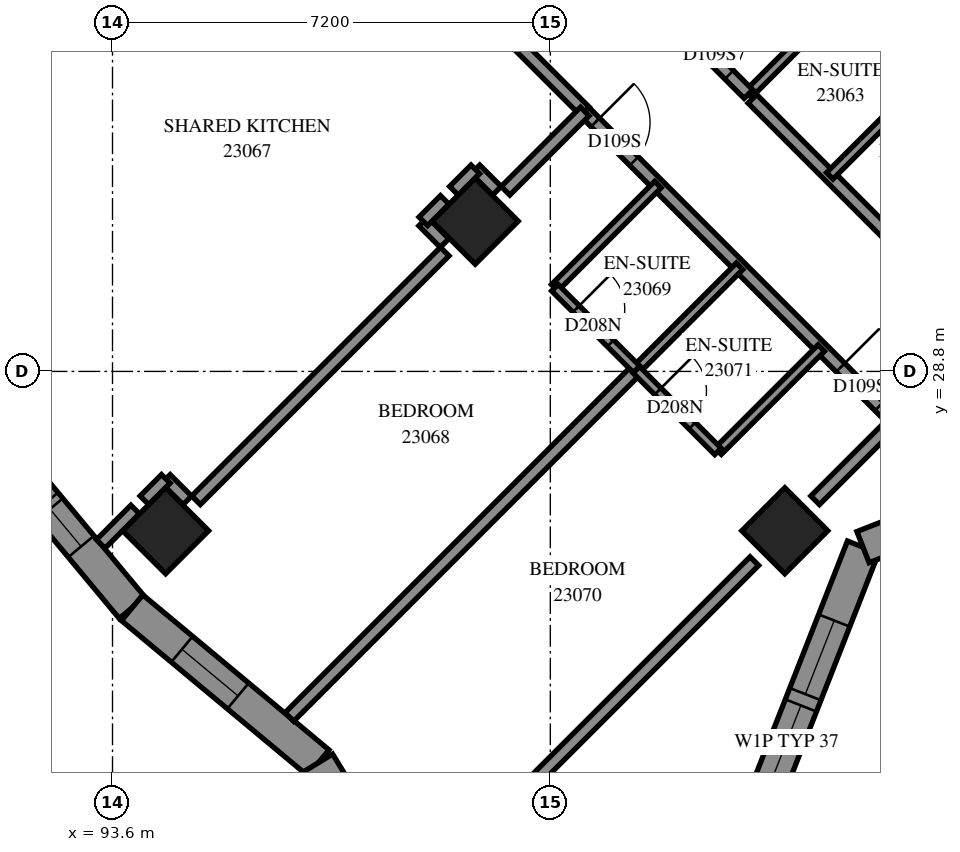
"""IFC4 building model, lengths in metres.
Left out: names, types, materials, properties, quantities, classifications, styles, units other than length and angle.
Written with IfcOpenShell. Run it as: python <this file> out.ifc"""

import sys

from ifc_helpers import new_model, si_unit, direction, frame, frame_2d, origin, origin_2d, place, context, subcontext, project, spatial, polyline, rectangle, outline, extrude, element, fill, save


model = new_model("IFC4")
c1 = context("Model", 3, precision=1e-05, world=origin(), true_north=direction((0.0, 1.0)))
c2 = subcontext(c1, "Body", "Model", "MODEL_VIEW")
j1 = project(units=[si_unit("LENGTHUNIT", "METRE"), si_unit("PLANEANGLEUNIT", "RADIAN")], contexts=[c1])
p1 = place(None, origin())
s1 = spatial("IfcSite", under=j1, at=p1, CompositionType="ELEMENT")
p2 = place(p1, origin())
s2 = spatial("IfcBuilding", under=s1, at=p2, CompositionType="ELEMENT")
p3 = place(p2, frame((0.0, 0.0, 88.0)))
s3 = spatial("IfcBuildingStorey", under=s2, at=p3, CompositionType="ELEMENT", Elevation=88.0)
for number, where, z_axis, x_axis in (
    (1, (99.565, 31.271, 0.0), (0.0, 0.0, 1.0), (0.707, -0.707, 0.0)),
    (2, (94.474, 26.18, 0.0), (0.0, 0.0, 1.0), (0.707, -0.707, 0.0)),
    (3, (104.656, 26.18, 0.0), (0.0, 0.0, 1.0), (0.707, -0.707, 0.0)),
):
    element("IfcColumn", number, at=place(p3, frame(where, z_axis=z_axis, x_axis=x_axis)), inside=s3, PredefinedType="COLUMN", context=c2, shape_type="SweptSolid", body=[
        extrude(rectangle(XDim=1.0, YDim=1.0, at=origin_2d()), origin(), (0.0, 0.0, 1.0), 3.1),
    ])
p4 = place(p3, frame((103.936, 20.796, 0.0), z_axis=(0.0, 0.0, 1.0), x_axis=(0.3651939331, 0.9309314643, 0.0)))
e4 = element("IfcWall", 4, at=p4, inside=s3, PredefinedType="SOLIDWALL", context=c2, shape_type="SweptSolid", body=[
    extrude(outline(polyline([(-0.125, -0.275), (5.374, -0.275), (5.614, 0.275), (0.125, 0.275), (-0.125, -0.275)])), origin(), (0.0, 0.0, 1.0), 3.1),
])
p5 = place(p4, frame((1.397, 0.0, 0.5)))
e5 = element("IfcOpeningElement", 5, at=p5, cuts=e4, PredefinedType="OPENING", context=c2, shape_type="SweptSolid", body=[
    extrude(rectangle(XDim=1.3, YDim=2.45, at=frame_2d((0.65, 1.225))), frame((0.0, 0.285, 0.0), z_axis=(0.0, -1.0, 0.0), x_axis=(1.0, 0.0, 0.0)), (0.0, 0.0, 1.0), 0.57),
])
p6 = place(p4, frame((2.897, 0.0, 0.5)))
e6 = element("IfcOpeningElement", 6, at=p6, cuts=e4, PredefinedType="OPENING", context=c2, shape_type="SweptSolid", body=[
    extrude(rectangle(XDim=1.3, YDim=2.45, at=frame_2d((0.65, 1.225))), frame((0.0, 0.285, 0.0), z_axis=(0.0, -1.0, 0.0), x_axis=(1.0, 0.0, 0.0)), (0.0, 0.0, 1.0), 0.57),
])
p7 = place(p3, frame((105.942, 25.91, 0.0), z_axis=(0.0, 0.0, 1.0), x_axis=(0.9309314643, 0.3651939331, 0.0)))
e7 = element("IfcWall", 7, at=p7, inside=s3, PredefinedType="SOLIDWALL", context=c2, shape_type="SweptSolid", body=[
    extrude(outline(polyline([(0.12, -0.275), (5.62, -0.275), (5.369, 0.275), (-0.12, 0.275), (0.12, -0.275)])), origin(), (0.0, 0.0, 1.0), 3.1),
])
p8 = place(p7, frame((0.605, 0.0, 0.5)))
e8 = element("IfcOpeningElement", 8, at=p8, cuts=e7, PredefinedType="OPENING", context=c2, shape_type="SweptSolid", body=[
    extrude(rectangle(XDim=1.2, YDim=2.45, at=frame_2d((0.6, 1.225))), frame((0.0, 0.285, 0.0), z_axis=(0.0, -1.0, 0.0), x_axis=(1.0, 0.0, 0.0)), (0.0, 0.0, 1.0), 0.57),
])
p9 = place(p7, frame((3.089, 0.0, 0.5)))
e9 = element("IfcOpeningElement", 9, at=p9, cuts=e7, PredefinedType="OPENING", context=c2, shape_type="SweptSolid", body=[
    extrude(rectangle(XDim=1.2, YDim=2.45, at=frame_2d((0.6, 1.225))), frame((0.0, 0.285, 0.0), z_axis=(0.0, -1.0, 0.0), x_axis=(1.0, 0.0, 0.0)), (0.0, 0.0, 1.0), 0.57),
])
p10 = place(p3, frame((91.387, 27.959, 0.0), z_axis=(0.0, 0.0, 1.0), x_axis=(0.6397673833, -0.7685686016, 0.0)))
e10 = element("IfcWall", 10, at=p10, inside=s3, PredefinedType="SOLIDWALL", context=c2, shape_type="SweptSolid", body=[
    extrude(outline(polyline([(0.025, -0.275), (3.989, -0.275), (3.938, 0.275), (-0.025, 0.275), (0.025, -0.275)])), origin(), (0.0, 0.0, 1.0), 3.1),
])
p11 = place(p10, frame((0.428, 0.0, 0.5)))
e11 = element("IfcOpeningElement", 11, at=p11, cuts=e10, PredefinedType="OPENING", context=c2, shape_type="SweptSolid", body=[
    extrude(rectangle(XDim=1.3, YDim=2.45, at=frame_2d((0.65, 1.225))), frame((0.0, 0.285, 0.0), z_axis=(0.0, -1.0, 0.0), x_axis=(1.0, 0.0, 0.0)), (0.0, 0.0, 1.0), 0.57),
])
p12 = place(p10, frame((1.852, 0.0, 0.45)))
e12 = element("IfcOpeningElement", 12, at=p12, cuts=e10, PredefinedType="OPENING", context=c2, shape_type="SweptSolid", body=[
    extrude(rectangle(XDim=0.8, YDim=2.5, at=frame_2d((0.4, 1.25))), frame((0.0, 0.285, 0.0), z_axis=(0.0, -1.0, 0.0), x_axis=(1.0, 0.0, 0.0)), (0.0, 0.0, 1.0), 0.57),
])
p13 = place(p3, frame((93.923, 24.913, 0.0), z_axis=(0.0, 0.0, 1.0), x_axis=(0.7685750371, -0.639759652, 0.0)))
e13 = element("IfcWall", 13, at=p13, inside=s3, PredefinedType="SOLIDWALL", context=c2, shape_type="SweptSolid", body=[
    extrude(outline(polyline([(-0.025, -0.275), (3.938, -0.275), (4.03, 0.275), (0.025, 0.275), (-0.025, -0.275)])), origin(), (0.0, 0.0, 1.0), 3.1),
])
p14 = place(p13, frame((1.066, 0.0, 0.5)))
e14 = element("IfcOpeningElement", 14, at=p14, cuts=e13, PredefinedType="OPENING", context=c2, shape_type="SweptSolid", body=[
    extrude(rectangle(XDim=1.2, YDim=2.45, at=frame_2d((0.6, 1.225))), frame((0.0, 0.285, 0.0), z_axis=(0.0, -1.0, 0.0), x_axis=(1.0, 0.0, 0.0)), (0.0, 0.0, 1.0), 0.57),
])
p15 = place(p3, frame((96.985, 22.364, 0.0), z_axis=(0.0, 0.0, 1.0), x_axis=(0.5197558303, -0.8543148581, 0.0)))
e15 = element("IfcWall", 15, at=p15, inside=s3, PredefinedType="SOLIDWALL", context=c2, shape_type="SweptSolid", body=[
    extrude(outline(polyline([(0.046, -0.275), (4.108, -0.275), (3.661, 0.275), (-0.046, 0.275), (0.046, -0.275)])), origin(), (0.0, 0.0, 1.0), 3.1),
])
p16 = place(p15, frame((0.903, 0.0, 0.5)))
e16 = element("IfcOpeningElement", 16, at=p16, cuts=e15, PredefinedType="OPENING", context=c2, shape_type="SweptSolid", body=[
    extrude(rectangle(XDim=1.2, YDim=2.45, at=frame_2d((0.6, 1.225))), frame((0.0, 0.285, 0.0), z_axis=(0.0, -1.0, 0.0), x_axis=(1.0, 0.0, 0.0)), (0.0, 0.0, 1.0), 0.57),
])
p17 = place(p3, frame((96.509, 23.118, 0.0), z_axis=(0.0, 0.0, 1.0), x_axis=(0.7069829425, 0.7072305982, 0.0)))
e17 = element("IfcWall", 17, at=p17, inside=s3, PredefinedType="PARTITIONING", context=c2, shape_type="SweptSolid", body=[
    extrude(rectangle(XDim=8.076, YDim=0.2, at=frame_2d((4.038, 0.0))), origin(), (0.0, 0.0, 1.0), 3.1),
])
p18 = place(p3, frame((101.365, 33.071, 0.0), z_axis=(0.0, 0.0, 1.0), x_axis=(0.7071067812, -0.7071067812, 0.0)))
e18 = element("IfcWall", 18, at=p18, inside=s3, PredefinedType="PARTITIONING", context=c2, shape_type="SweptSolid", body=[
    extrude(rectangle(XDim=7.2, YDim=0.2, at=frame_2d((3.6, 0.0))), origin(), (0.0, 0.0, 1.0), 3.1),
])
p19 = place(p18, frame((0.248, 0.0, 0.0)))
e19 = element("IfcOpeningElement", 19, at=p19, cuts=e18, PredefinedType="OPENING", context=c2, shape_type="SweptSolid", body=[
    extrude(rectangle(XDim=0.9, YDim=2.1, at=frame_2d((0.45, 1.05))), frame((0.0, 0.11, 0.0), z_axis=(0.0, -1.0, 0.0), x_axis=(1.0, 0.0, 0.0)), (0.0, 0.0, 1.0), 0.22),
])
p20 = place(p18, frame((5.95, 0.0, 0.0)))
e20 = element("IfcOpeningElement", 20, at=p20, cuts=e18, PredefinedType="OPENING", context=c2, shape_type="SweptSolid", body=[
    extrude(rectangle(XDim=0.9, YDim=2.1, at=frame_2d((0.45, 1.05))), frame((0.0, 0.11, 0.0), z_axis=(0.0, -1.0, 0.0), x_axis=(1.0, 0.0, 0.0)), (0.0, 0.0, 1.0), 0.22),
])
p21 = place(p3, frame((89.881, 31.771, 0.0), z_axis=(0.0, 0.0, 1.0), x_axis=(0.7071067812, 0.7071067812, 0.0)))
e21 = element("IfcWall", 21, at=p21, inside=s3, PredefinedType="PARTITIONING", context=c2, shape_type="SweptSolid", body=[
    extrude(rectangle(XDim=5.787, YDim=0.2, at=frame_2d((2.893, 0.0))), origin(), (0.0, 0.0, 1.0), 3.1),
])
p22 = place(p3, frame((100.063, 21.589, 0.0), z_axis=(0.0, 0.0, 1.0), x_axis=(0.7071067812, 0.7071067812, 0.0)))
e22 = element("IfcWall", 22, at=p22, inside=s3, PredefinedType="PARTITIONING", context=c2, shape_type="SweptSolid", body=[
    extrude(rectangle(XDim=5.787, YDim=0.2, at=frame_2d((2.893, 0.0))), origin(), (0.0, 0.0, 1.0), 2.6),
])
p23 = place(p3, frame((94.973, 26.681, 0.0), z_axis=(0.0, 0.0, 1.0), x_axis=(0.7071067812, 0.7071067812, 0.0)))
e23 = element("IfcWall", 23, at=p23, inside=s3, PredefinedType="PARTITIONING", context=c2, shape_type="SweptSolid", body=[
    extrude(rectangle(XDim=5.784, YDim=0.2, at=frame_2d((2.892, 0.0))), origin(), (0.0, 0.0, 1.0), 3.1),
])
p24 = place(p3, frame((104.123, 33.282, 0.0), z_axis=(0.0, 0.0, 1.0), x_axis=(0.7071067812, -0.7071067812, 0.0)))
e24 = element("IfcWall", 24, at=p24, inside=s3, PredefinedType="PARTITIONING", context=c2, shape_type="SweptSolid", body=[
    extrude(rectangle(XDim=5.399, YDim=0.2, at=frame_2d((2.7, 0.0))), origin(), (0.0, 0.0, 1.0), 3.1),
])
p25 = place(p24, frame((4.08, 0.0, 0.0)))
e25 = element("IfcOpeningElement", 25, at=p25, cuts=e24, PredefinedType="OPENING", context=c2, shape_type="SweptSolid", body=[
    extrude(rectangle(XDim=0.9, YDim=2.1, at=frame_2d((0.45, 1.05))), frame((0.0, 0.11, 0.0), z_axis=(0.0, -1.0, 0.0), x_axis=(1.0, 0.0, 0.0)), (0.0, 0.0, 1.0), 0.22),
])
p26 = place(p3, frame((98.469, 35.973, 0.0), z_axis=(0.0, 0.0, 1.0), x_axis=(0.7073506531, -0.7068628251, 0.0)))
e26 = element("IfcWall", 26, at=p26, inside=s3, PredefinedType="PARTITIONING", context=c2, shape_type="SweptSolid", body=[
    extrude(rectangle(XDim=4.1, YDim=0.2, at=frame_2d((2.05, 0.0))), origin(), (0.0, 0.0, 1.0), 3.1),
])
p27 = place(p26, frame((0.457, 0.0, 0.0)))
e27 = element("IfcOpeningElement", 27, at=p27, cuts=e26, PredefinedType="OPENING", context=c2, shape_type="SweptSolid", body=[
    extrude(rectangle(XDim=1.0, YDim=2.1, at=frame_2d((0.5, 1.05))), frame((0.0, 0.11, 0.0), z_axis=(0.0, -1.0, 0.0), x_axis=(1.0, 0.0, 0.0)), (0.0, 0.0, 1.0), 0.22),
])
p28 = place(p3, frame((100.871, 30.175, 0.0), z_axis=(0.0, 0.0, 1.0), x_axis=(0.7071067812, 0.7071067812, 0.0)))
e28 = element("IfcWall", 28, at=p28, inside=s3, PredefinedType="PARTITIONING", context=c2, shape_type="SweptSolid", body=[
    extrude(rectangle(XDim=2.401, YDim=0.15, at=frame_2d((1.201, 0.0))), origin(), (0.0, 0.0, 1.0), 3.1),
])
p29 = place(p3, frame((105.396, 32.016, 0.0), z_axis=(0.0, 0.0, 1.0), x_axis=(0.7075233388, 0.706689978, 0.0)))
e29 = element("IfcWall", 29, at=p29, inside=s3, PredefinedType="PARTITIONING", context=c2, shape_type="SweptSolid", body=[
    extrude(rectangle(XDim=2.4, YDim=0.15, at=frame_2d((1.2, 0.0))), origin(), (0.0, 0.0, 1.0), 3.1),
])
for number, where, z_axis, x_axis in (
    (30, (102.216, 28.832, 0.0), (0.0, 0.0, 1.0), (0.707, 0.707, 0.0)),
    (31, (104.055, 33.359, 0.0), (0.0, 0.0, 1.0), (0.707, 0.707, 0.0)),
    (32, (103.559, 27.489, 0.0), (0.0, 0.0, 1.0), (0.707, 0.707, 0.0)),
):
    element("IfcWall", number, at=place(p3, frame(where, z_axis=z_axis, x_axis=x_axis)), inside=s3, PredefinedType="PARTITIONING", context=c2, shape_type="SweptSolid", body=[
        extrude(rectangle(XDim=2.398, YDim=0.15, at=frame_2d((1.199, 0.0))), origin(), (0.0, 0.0, 1.0), 3.1),
    ])
p30 = place(p3, frame((105.749, 35.051, 0.0), z_axis=(0.0, 0.0, 1.0), x_axis=(0.7071067812, -0.7071067812, 0.0)))
e33 = element("IfcWall", 33, at=p30, inside=s3, PredefinedType="PARTITIONING", context=c2, shape_type="SweptSolid", body=[
    extrude(rectangle(XDim=1.901, YDim=0.15, at=frame_2d((0.95, 0.0))), origin(), (0.0, 0.0, 1.0), 3.1),
])
p31 = place(p30, frame((0.493, 0.0, 0.0)))
e34 = element("IfcOpeningElement", 34, at=p31, cuts=e33, PredefinedType="OPENING", context=c2, shape_type="SweptSolid", body=[
    extrude(rectangle(XDim=0.8, YDim=2.1, at=frame_2d((0.4, 1.05))), frame((0.0, 0.085, 0.0), z_axis=(0.0, -1.0, 0.0), x_axis=(1.0, 0.0, 0.0)), (0.0, 0.0, 1.0), 0.17),
])
p32 = place(p3, frame((100.875, 30.177, 0.0), z_axis=(0.0, 0.0, 1.0), x_axis=(0.7076330979, -0.7065800724, 0.0)))
e35 = element("IfcWall", 35, at=p32, inside=s3, PredefinedType="PARTITIONING", context=c2, shape_type="SweptSolid", body=[
    extrude(rectangle(XDim=1.899, YDim=0.15, at=frame_2d((0.95, 0.0))), origin(), (0.0, 0.0, 1.0), 3.1),
])
p33 = place(p32, frame((0.493, 0.0, 0.0)))
e36 = element("IfcOpeningElement", 36, at=p33, cuts=e35, PredefinedType="OPENING", context=c2, shape_type="SweptSolid", body=[
    extrude(rectangle(XDim=0.8, YDim=2.1, at=frame_2d((0.4, 1.05))), frame((0.0, 0.085, 0.0), z_axis=(0.0, -1.0, 0.0), x_axis=(1.0, 0.0, 0.0)), (0.0, 0.0, 1.0), 0.17),
])
p34 = place(p3, frame((102.215, 28.826, 0.0), z_axis=(0.0, 0.0, 1.0), x_axis=(0.7071067812, -0.7071067812, 0.0)))
e37 = element("IfcWall", 37, at=p34, inside=s3, PredefinedType="PARTITIONING", context=c2, shape_type="SweptSolid", body=[
    extrude(rectangle(XDim=1.898, YDim=0.15, at=frame_2d((0.949, 0.0))), origin(), (0.0, 0.0, 1.0), 3.1),
])
p35 = place(p34, frame((0.5, 0.0, 0.0)))
e38 = element("IfcOpeningElement", 38, at=p35, cuts=e37, PredefinedType="OPENING", context=c2, shape_type="SweptSolid", body=[
    extrude(rectangle(XDim=0.8, YDim=2.1, at=frame_2d((0.4, 1.05))), frame((0.0, 0.085, 0.0), z_axis=(0.0, -1.0, 0.0), x_axis=(1.0, 0.0, 0.0)), (0.0, 0.0, 1.0), 0.17),
])
p36 = place(p3, frame((100.063, 31.771, 0.0), z_axis=(0.0, 0.0, 1.0), x_axis=(0.7071067812, 0.7071067812, 0.0)))
e39 = element("IfcWall", 39, at=p36, inside=s3, PredefinedType="PARTITIONING", context=c2, shape_type="SweptSolid", body=[
    extrude(rectangle(XDim=1.844, YDim=0.2, at=frame_2d((0.922, 0.0))), origin(), (0.0, 0.0, 1.0), 3.1),
])
p37 = place(p3, frame((105.155, 26.681, 0.0), z_axis=(0.0, 0.0, 1.0), x_axis=(0.7071067812, 0.7071067812, 0.0)))
e40 = element("IfcWall", 40, at=p37, inside=s3, PredefinedType="PARTITIONING", context=c2, shape_type="SweptSolid", body=[
    extrude(rectangle(XDim=1.841, YDim=0.2, at=frame_2d((0.921, 0.0))), origin(), (0.0, 0.0, 1.0), 2.6),
])
p38 = place(p3, frame((102.857, 34.563, 0.0), z_axis=(0.0, 0.0, 1.0), x_axis=(0.7071067812, -0.7071067812, 0.0)))
e41 = element("IfcWall", 41, at=p38, inside=s3, PredefinedType="PARTITIONING", context=c2, shape_type="SweptSolid", body=[
    extrude(rectangle(XDim=1.7, YDim=0.2, at=frame_2d((0.85, 0.0))), origin(), (0.0, 0.0, 1.0), 3.1),
])
p39 = place(p38, frame((0.35, 0.0, 0.0)))
e42 = element("IfcOpeningElement", 42, at=p39, cuts=e41, PredefinedType="OPENING", context=c2, shape_type="SweptSolid", body=[
    extrude(rectangle(XDim=0.9, YDim=2.1, at=frame_2d((0.45, 1.05))), frame((0.0, 0.11, 0.0), z_axis=(0.0, -1.0, 0.0), x_axis=(1.0, 0.0, 0.0)), (0.0, 0.0, 1.0), 0.22),
])
p40 = place(p3, frame((93.407, 25.963, 0.0), z_axis=(0.0, 0.0, 1.0), x_axis=(0.7070443297, 0.7071692271, 0.0)))
e43 = element("IfcWall", 43, at=p40, inside=s3, PredefinedType="PARTITIONING", context=c2, shape_type="SweptSolid", body=[
    extrude(rectangle(XDim=0.801, YDim=0.2, at=frame_2d((0.4, 0.0))), origin(), (0.0, 0.0, 1.0), 3.1),
])
p41 = place(p3, frame((98.709, 31.265, 0.0), z_axis=(0.0, 0.0, 1.0), x_axis=(0.7051008166, -0.7091070712, 0.0)))
e44 = element("IfcWall", 44, at=p41, inside=s3, PredefinedType="PARTITIONING", context=c2, shape_type="SweptSolid", body=[
    extrude(rectangle(XDim=0.499, YDim=0.2, at=frame_2d((0.25, 0.0))), origin(), (0.0, 0.0, 1.0), 3.1),
])
for number, where, z_axis, x_axis in (
    (45, (99.569, 32.123, 0.0), (0.0, 0.0, 1.0), (0.707, -0.707, 0.0)),
    (46, (94.478, 27.032, 0.0), (0.0, 0.0, 1.0), (0.707, -0.707, 0.0)),
    (47, (94.125, 26.681, 0.0), (0.0, 0.0, 1.0), (0.707, 0.707, 0.0)),
    (48, (99.215, 31.771, 0.0), (0.0, 0.0, 1.0), (0.707, 0.707, 0.0)),
    (49, (98.712, 31.268, 0.0), (0.0, 0.0, 1.0), (0.707, 0.707, 0.0)),
):
    element("IfcWall", number, at=place(p3, frame(where, z_axis=z_axis, x_axis=x_axis)), inside=s3, PredefinedType="PARTITIONING", context=c2, shape_type="SweptSolid", body=[
        extrude(rectangle(XDim=0.498, YDim=0.2, at=frame_2d((0.249, 0.0))), origin(), (0.0, 0.0, 1.0), 3.1),
    ])
p42 = place(p5, origin())
e50 = element("IfcWindow", 50, at=p42, inside=s3, PartitioningType="SINGLE_PANEL", PredefinedType="WINDOW", context=c2, shape_type="SweptSolid", body=[
    extrude(rectangle(XDim=1.3, YDim=2.45, at=frame_2d((0.65, 1.225))), frame((0.0, 0.155, 0.0), z_axis=(0.0, -1.0, 0.0), x_axis=(1.0, 0.0, 0.0)), (0.0, 0.0, 1.0), 0.06),
])
fill(e5, e50)
p43 = place(p6, origin())
e51 = element("IfcWindow", 51, at=p43, inside=s3, PartitioningType="SINGLE_PANEL", PredefinedType="WINDOW", context=c2, shape_type="SweptSolid", body=[
    extrude(rectangle(XDim=1.3, YDim=2.45, at=frame_2d((0.65, 1.225))), frame((0.0, 0.155, 0.0), z_axis=(0.0, -1.0, 0.0), x_axis=(1.0, 0.0, 0.0)), (0.0, 0.0, 1.0), 0.06),
])
fill(e6, e51)
p44 = place(p14, origin())
e52 = element("IfcWindow", 52, at=p44, inside=s3, PartitioningType="SINGLE_PANEL", PredefinedType="WINDOW", context=c2, shape_type="SweptSolid", body=[
    extrude(rectangle(XDim=1.2, YDim=2.45, at=frame_2d((0.6, 1.225))), frame((0.0, 0.155, 0.0), z_axis=(0.0, -1.0, 0.0), x_axis=(1.0, 0.0, 0.0)), (0.0, 0.0, 1.0), 0.06),
])
fill(e14, e52)
p45 = place(p39, origin())
e53 = element("IfcDoor", 53, at=p45, inside=s3, OperationType="SINGLE_SWING_LEFT", PredefinedType="DOOR", context=c2, shape_type="SweptSolid", body=[
    extrude(rectangle(XDim=0.9, YDim=2.1, at=frame_2d((0.45, 1.05))), frame((0.0, 0.025, 0.0), z_axis=(0.0, -1.0, 0.0), x_axis=(1.0, 0.0, 0.0)), (0.0, 0.0, 1.0), 0.05),
])
fill(e42, e53)
p46 = place(p19, origin())
e54 = element("IfcDoor", 54, at=p46, inside=s3, OperationType="SINGLE_SWING_RIGHT", PredefinedType="DOOR", context=c2, shape_type="SweptSolid", body=[
    extrude(rectangle(XDim=0.9, YDim=2.1, at=frame_2d((0.45, 1.05))), frame((0.0, 0.025, 0.0), z_axis=(0.0, -1.0, 0.0), x_axis=(1.0, 0.0, 0.0)), (0.0, 0.0, 1.0), 0.05),
])
fill(e19, e54)
p47 = place(p33, origin())
e55 = element("IfcDoor", 55, at=p47, inside=s3, OperationType="SINGLE_SWING_RIGHT", PredefinedType="DOOR", context=c2, shape_type="SweptSolid", body=[
    extrude(rectangle(XDim=0.8, YDim=2.1, at=frame_2d((0.4, 1.05))), frame((0.0, 0.025, 0.0), z_axis=(0.0, -1.0, 0.0), x_axis=(1.0, 0.0, 0.0)), (0.0, 0.0, 1.0), 0.05),
])
fill(e36, e55)
p48 = place(p20, origin())
e56 = element("IfcDoor", 56, at=p48, inside=s3, OperationType="SINGLE_SWING_LEFT", PredefinedType="DOOR", context=c2, shape_type="SweptSolid", body=[
    extrude(rectangle(XDim=0.9, YDim=2.1, at=frame_2d((0.45, 1.05))), frame((0.0, 0.025, 0.0), z_axis=(0.0, -1.0, 0.0), x_axis=(1.0, 0.0, 0.0)), (0.0, 0.0, 1.0), 0.05),
])
fill(e20, e56)
p49 = place(p35, origin())
e57 = element("IfcDoor", 57, at=p49, inside=s3, OperationType="SINGLE_SWING_RIGHT", PredefinedType="DOOR", context=c2, shape_type="SweptSolid", body=[
    extrude(rectangle(XDim=0.8, YDim=2.1, at=frame_2d((0.4, 1.05))), frame((0.0, 0.025, 0.0), z_axis=(0.0, -1.0, 0.0), x_axis=(1.0, 0.0, 0.0)), (0.0, 0.0, 1.0), 0.05),
])
fill(e38, e57)
p50 = place(p12, origin())
e58 = element("IfcWindow", 58, at=p50, inside=s3, PartitioningType="SINGLE_PANEL", PredefinedType="WINDOW", context=c2, shape_type="SweptSolid", body=[
    extrude(rectangle(XDim=0.8, YDim=2.5, at=frame_2d((0.4, 1.25))), frame((0.0, 0.155, 0.0), z_axis=(0.0, -1.0, 0.0), x_axis=(1.0, 0.0, 0.0)), (0.0, 0.0, 1.0), 0.06),
])
fill(e12, e58)
save(model, sys.argv[1])
